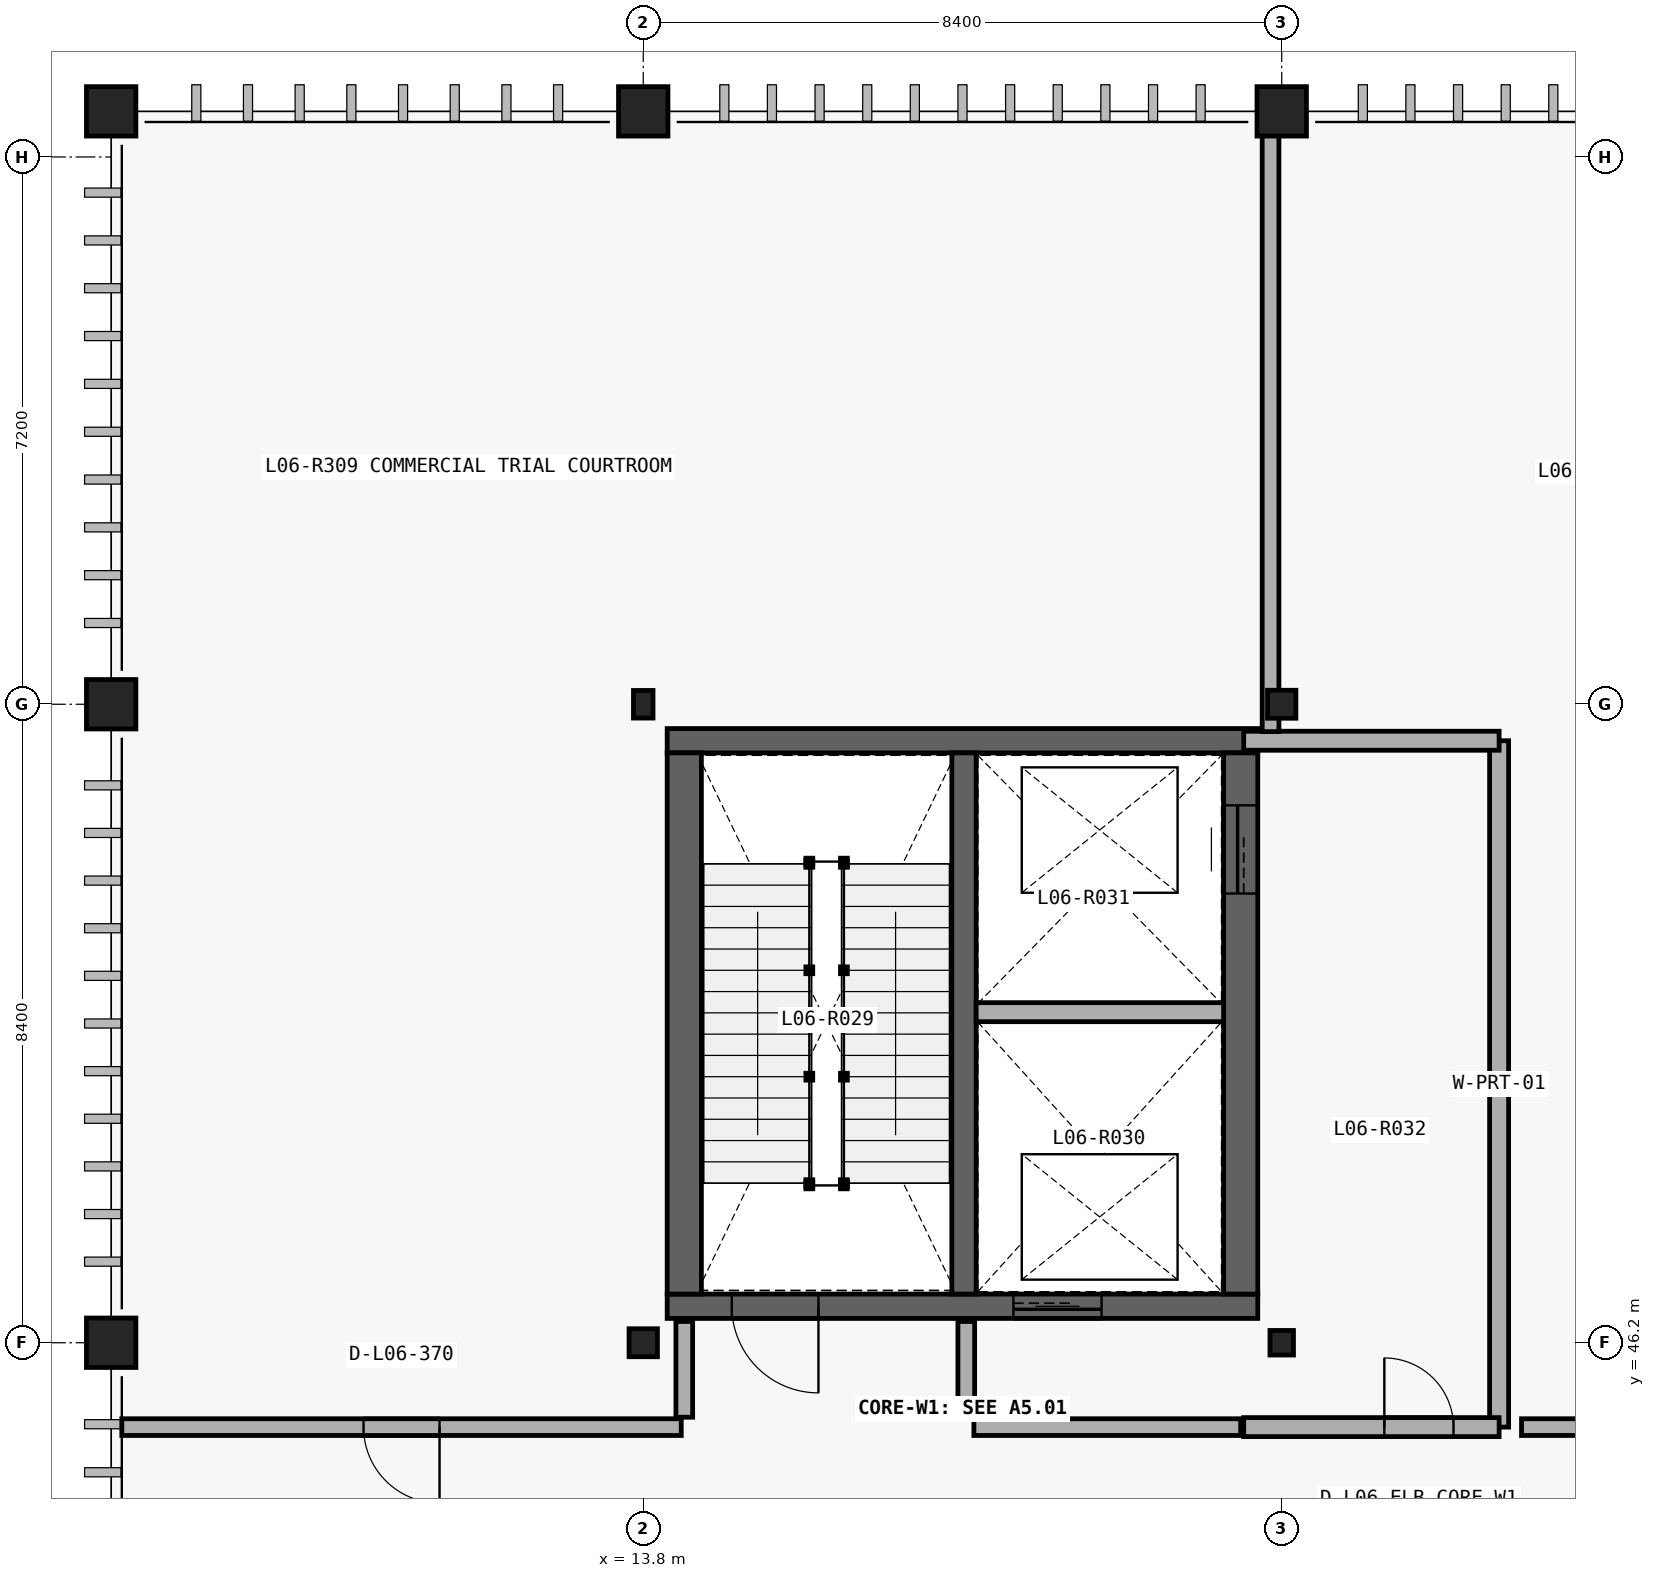
"""IFC4 building model, lengths in metres.
Left out: names, types, materials, properties, quantities, classifications, styles, units other than length and angle.
Written with IfcOpenShell. Run it as: python <this file> out.ifc"""

import sys

from ifc_helpers import new_model, si_unit, direction, frame, frame_2d, origin_with_axes, origin_2d_with_axis, place, context, subcontext, project, spatial, rectangle, circle, i_section, extrude, element, fill, save


model = new_model("IFC4")
c1 = context("Model", 3, precision=1e-05, world=origin_with_axes(), true_north=direction((0.0, 1.0)))
c2 = subcontext(c1, "Body", "Model", "MODEL_VIEW")
j1 = project(units=[si_unit("LENGTHUNIT", "METRE"), si_unit("PLANEANGLEUNIT", "RADIAN")], contexts=[c1])
p1 = place(None, origin_with_axes())
s1 = spatial("IfcSite", under=j1, at=p1, CompositionType="ELEMENT")
p2 = place(p1, origin_with_axes())
s2 = spatial("IfcBuilding", under=s1, at=p2, CompositionType="ELEMENT")
p3 = place(p2, frame((0.0, 0.0, 29.7), z_axis=(0.0, 0.0, 1.0), x_axis=(1.0, 0.0, 0.0)))
s3 = spatial("IfcBuildingStorey", under=s2, at=p3, CompositionType="ELEMENT", Elevation=29.7)
p4 = place(None, frame((14.115, 46.68, 29.7), z_axis=(0.0, 0.0, 1.0), x_axis=(1.0, 0.0, 0.0)))
e1 = element("IfcWall", 1, at=p4, inside=s3, PredefinedType="SHEAR", context=c2, shape_type="SweptSolid", body=[
    extrude(rectangle(XDim=7.77, YDim=0.32, at=frame_2d((3.885, 0.0), x_axis=(1.0, 0.0))), origin_with_axes(), (0.0, 0.0, 1.0), 4.8),
])
p5 = place(None, frame((15.535, 46.68, 29.7), z_axis=(0.0, 0.0, 1.0), x_axis=(1.0, 0.0, 0.0)))
e2 = element("IfcOpeningElement", 2, at=p5, cuts=e1, PredefinedType="OPENING", context=c2, shape_type="SweptSolid", body=[
    extrude(rectangle(XDim=1.14, YDim=2.18, at=frame_2d((0.0, 1.09), x_axis=(1.0, 0.0))), frame((0.0, 0.17, 0.0), z_axis=(0.0, -1.0, 0.0), x_axis=(1.0, 0.0, 0.0)), (0.0, 0.0, 1.0), 0.34),
])
p6 = place(None, frame((19.25, 46.68, 29.7), z_axis=(0.0, 0.0, 1.0), x_axis=(1.0, 0.0, 0.0)))
e3 = element("IfcOpeningElement", 3, at=p6, cuts=e1, PredefinedType="OPENING", context=c2, shape_type="SweptSolid", body=[
    extrude(rectangle(XDim=1.16, YDim=2.2, at=frame_2d((0.0, 1.1), x_axis=(1.0, 0.0))), frame((0.0, 0.17, 0.0), z_axis=(0.0, -1.0, 0.0), x_axis=(1.0, 0.0, 0.0)), (0.0, 0.0, 1.0), 0.34),
])
p7 = place(None, frame((21.885, 54.12, 29.7), z_axis=(0.0, 0.0, 1.0), x_axis=(-1.0, 0.0, 0.0)))
e4 = element("IfcWall", 4, at=p7, inside=s3, PredefinedType="SHEAR", context=c2, shape_type="SweptSolid", body=[
    extrude(rectangle(XDim=7.77, YDim=0.32, at=frame_2d((3.885, 0.0), x_axis=(1.0, 0.0))), origin_with_axes(), (0.0, 0.0, 1.0), 4.8),
])
p8 = place(None, frame((21.66, 46.84, 29.7), z_axis=(0.0, 0.0, 1.0), x_axis=(0.0, 1.0, 0.0)))
e5 = element("IfcWall", 5, at=p8, inside=s3, PredefinedType="SHEAR", context=c2, shape_type="SweptSolid", body=[
    extrude(rectangle(XDim=7.12, YDim=0.45, at=frame_2d((3.56, 0.0), x_axis=(1.0, 0.0))), origin_with_axes(), (0.0, 0.0, 1.0), 4.8),
])
p9 = place(None, frame((21.66, 52.69, 29.7), z_axis=(0.0, 0.0, 1.0), x_axis=(0.0, 1.0, 0.0)))
e6 = element("IfcOpeningElement", 6, at=p9, cuts=e5, PredefinedType="OPENING", context=c2, shape_type="SweptSolid", body=[
    extrude(rectangle(XDim=1.16, YDim=2.2, at=frame_2d((0.0, 1.1), x_axis=(1.0, 0.0))), frame((0.0, 0.235, 0.0), z_axis=(0.0, -1.0, 0.0), x_axis=(1.0, 0.0, 0.0)), (0.0, 0.0, 1.0), 0.47),
])
p10 = place(None, frame((14.34, 53.96, 29.7), z_axis=(0.0, 0.0, 1.0), x_axis=(0.0, -1.0, 0.0)))
e7 = element("IfcWall", 7, at=p10, inside=s3, PredefinedType="SHEAR", context=c2, shape_type="SweptSolid", body=[
    extrude(rectangle(XDim=7.12, YDim=0.45, at=frame_2d((3.56, 0.0), x_axis=(1.0, 0.0))), origin_with_axes(), (0.0, 0.0, 1.0), 4.8),
])
p11 = place(None, frame((18.02, 46.84, 29.7), z_axis=(0.0, 0.0, 1.0), x_axis=(0.0, 1.0, 0.0)))
e8 = element("IfcWall", 8, at=p11, inside=s3, PredefinedType="SHEAR", context=c2, shape_type="SweptSolid", body=[
    extrude(rectangle(XDim=7.12, YDim=0.32, at=frame_2d((3.56, 0.0), x_axis=(1.0, 0.0))), origin_with_axes(), (0.0, 0.0, 1.0), 4.8),
])
p12 = place(None, frame((18.18, 50.549, 29.7), z_axis=(0.0, 0.0, 1.0), x_axis=(1.0, 0.0, 0.0)))
e9 = element("IfcWall", 9, at=p12, inside=s3, PredefinedType="PARTITIONING", context=c2, shape_type="SweptSolid", body=[
    extrude(rectangle(XDim=3.255, YDim=0.25, at=frame_2d((1.627, 0.0), x_axis=(1.0, 0.0))), origin_with_axes(), (0.0, 0.0, 1.0), 4.48),
])
p13 = place(None, frame((25.06, 45.09, 29.7), z_axis=(0.0, 0.0, 1.0), x_axis=(0.0, 1.0, 0.0)))
e10 = element("IfcWall", 10, at=p13, inside=s3, PredefinedType="PARTITIONING", context=c2, shape_type="SweptSolid", body=[
    extrude(rectangle(XDim=9.03, YDim=0.25, at=frame_2d((4.515, 0.0), x_axis=(1.0, 0.0))), origin_with_axes(), (0.0, 0.0, 1.0), 4.48),
])
p14 = place(None, frame((21.7, 54.12, 29.7), z_axis=(0.0, 0.0, 1.0), x_axis=(1.0, 0.0, 0.0)))
e11 = element("IfcWall", 11, at=p14, inside=s3, PredefinedType="PARTITIONING", context=c2, shape_type="SweptSolid", body=[
    extrude(rectangle(XDim=3.36, YDim=0.25, at=frame_2d((1.68, 0.0), x_axis=(1.0, 0.0))), origin_with_axes(), (0.0, 0.0, 1.0), 4.48),
])
p15 = place(None, frame((21.7, 45.09, 29.7), z_axis=(0.0, 0.0, 1.0), x_axis=(1.0, 0.0, 0.0)))
e12 = element("IfcWall", 12, at=p15, inside=s3, PredefinedType="PARTITIONING", context=c2, shape_type="SweptSolid", body=[
    extrude(rectangle(XDim=3.36, YDim=0.25, at=frame_2d((1.68, 0.0), x_axis=(1.0, 0.0))), origin_with_axes(), (0.0, 0.0, 1.0), 4.48),
])
p16 = place(None, frame((24.005, 45.09, 29.7), z_axis=(0.0, 0.0, 1.0), x_axis=(1.0, 0.0, 0.0)))
e13 = element("IfcOpeningElement", 13, at=p16, cuts=e12, PredefinedType="OPENING", context=c2, shape_type="SweptSolid", body=[
    extrude(rectangle(XDim=0.91, YDim=2.12, at=frame_2d((0.0, 1.06), x_axis=(1.0, 0.0))), frame((0.0, 0.135, 0.0), z_axis=(0.0, -1.0, 0.0), x_axis=(1.0, 0.0, 0.0)), (0.0, 0.0, 1.0), 0.27),
])
for number, where, z_axis, x_axis in (
    (14, (14.34, 45.22, 29.7), (0.0, 0.0, 1.0), (0.0, 1.0, 0.0)),
    (15, (18.05, 45.22, 29.7), (0.0, 0.0, 1.0), (0.0, 1.0, 0.0)),
):
    element("IfcWall", number, at=place(None, frame(where, z_axis=z_axis, x_axis=x_axis)), inside=s3, PredefinedType="PARTITIONING", context=c2, shape_type="SweptSolid", body=[
        extrude(rectangle(XDim=1.26, YDim=0.22, at=frame_2d((0.63, 0.0), x_axis=(1.0, 0.0))), origin_with_axes(), (0.0, 0.0, 1.0), 4.48),
    ])
p17 = place(None, frame((6.94, 45.09, 29.7), z_axis=(0.0, 0.0, 1.0), x_axis=(1.0, 0.0, 0.0)))
e16 = element("IfcWall", 16, at=p17, inside=s3, PredefinedType="PARTITIONING", context=c2, shape_type="SweptSolid", body=[
    extrude(rectangle(XDim=7.36, YDim=0.22, at=frame_2d((3.68, 0.0), x_axis=(1.0, 0.0))), origin_with_axes(), (0.0, 0.0, 1.0), 4.48),
])
p18 = place(None, frame((10.62, 45.09, 29.7), z_axis=(0.0, 0.0, 1.0), x_axis=(1.0, 0.0, 0.0)))
e17 = element("IfcOpeningElement", 17, at=p18, cuts=e16, PredefinedType="OPENING", context=c2, shape_type="SweptSolid", body=[
    extrude(rectangle(XDim=1.0, YDim=2.28, at=frame_2d((0.0, 1.14), x_axis=(1.0, 0.0))), frame((0.0, 0.12, 0.0), z_axis=(0.0, -1.0, 0.0), x_axis=(1.0, 0.0, 0.0)), (0.0, 0.0, 1.0), 0.24),
])
p19 = place(None, frame((18.15, 45.09, 29.7), z_axis=(0.0, 0.0, 1.0), x_axis=(1.0, 0.0, 0.0)))
e18 = element("IfcWall", 18, at=p19, inside=s3, PredefinedType="PARTITIONING", context=c2, shape_type="SweptSolid", body=[
    extrude(rectangle(XDim=3.51, YDim=0.22, at=frame_2d((1.755, 0.0), x_axis=(1.0, 0.0))), origin_with_axes(), (0.0, 0.0, 1.0), 4.48),
])
p20 = place(None, frame((25.355, 45.09, 29.7), z_axis=(0.0, 0.0, 1.0), x_axis=(1.0, 0.0, 0.0)))
e19 = element("IfcWall", 19, at=p20, inside=s3, PredefinedType="PARTITIONING", context=c2, shape_type="SweptSolid", body=[
    extrude(rectangle(XDim=5.745, YDim=0.22, at=frame_2d((2.873, 0.0), x_axis=(1.0, 0.0))), origin_with_axes(), (0.0, 0.0, 1.0), 4.48),
])
p21 = place(None, frame((28.227, 45.09, 29.7), z_axis=(0.0, 0.0, 1.0), x_axis=(1.0, 0.0, 0.0)))
e20 = element("IfcOpeningElement", 20, at=p21, cuts=e19, PredefinedType="OPENING", context=c2, shape_type="SweptSolid", body=[
    extrude(rectangle(XDim=1.88, YDim=2.56, at=frame_2d((0.0, 1.28), x_axis=(1.0, 0.0))), frame((0.0, 0.12, 0.0), z_axis=(0.0, -1.0, 0.0), x_axis=(1.0, 0.0, 0.0)), (0.0, 0.0, 1.0), 0.24),
])
p22 = place(None, frame((22.053, 54.24, 29.7), z_axis=(0.0, 0.0, 1.0), x_axis=(0.0, 1.0, 0.0)))
e21 = element("IfcWall", 21, at=p22, inside=s3, PredefinedType="PARTITIONING", context=c2, shape_type="SweptSolid", body=[
    extrude(rectangle(XDim=8.02, YDim=0.22, at=frame_2d((4.01, 0.0), x_axis=(1.0, 0.0))), origin_with_axes(), (0.0, 0.0, 1.0), 3.858),
])
for number, where, z_axis, x_axis in (
    (22, (6.8, 46.2, 29.7), (0.0, 0.0, 1.0), (1.0, 0.0, 0.0)),
    (23, (6.8, 54.6, 29.7), (0.0, 0.0, 1.0), (1.0, 0.0, 0.0)),
    (24, (6.8, 62.4, 29.7), (0.0, 0.0, 1.0), (1.0, 0.0, 0.0)),
):
    element("IfcColumn", number, at=place(None, frame(where, z_axis=z_axis, x_axis=x_axis)), inside=s3, PredefinedType="COLUMN", context=c2, shape_type="SweptSolid", body=[
        extrude(circle(Radius=0.325, at=origin_2d_with_axis()), origin_with_axes(), (0.0, 0.0, 1.0), 4.8),
    ])
p23 = place(None, frame((13.8, 46.2, 29.7), z_axis=(0.0, 0.0, 1.0), x_axis=(1.0, 0.0, 0.0)))
e25 = element("IfcColumn", 25, at=p23, inside=s3, PredefinedType="COLUMN", context=c2, shape_type="SweptSolid", body=[
    extrude(i_section(OverallWidth=0.373, OverallDepth=0.368, WebThickness=0.015, FlangeThickness=0.024, at=origin_2d_with_axis()), origin_with_axes(), (0.0, 0.0, 1.0), 4.8),
])
p24 = place(None, frame((13.8, 54.6, 29.7), z_axis=(0.0, 0.0, 1.0), x_axis=(1.0, 0.0, 0.0)))
e26 = element("IfcColumn", 26, at=p24, inside=s3, PredefinedType="COLUMN", context=c2, shape_type="SweptSolid", body=[
    extrude(i_section(OverallWidth=0.257, OverallDepth=0.363, WebThickness=0.013, FlangeThickness=0.022, at=origin_2d_with_axis()), origin_with_axes(), (0.0, 0.0, 1.0), 4.8),
])
p25 = place(None, frame((13.8, 62.4, 29.7), z_axis=(0.0, 0.0, 1.0), x_axis=(1.0, 0.0, 0.0)))
e27 = element("IfcColumn", 27, at=p25, inside=s3, PredefinedType="COLUMN", context=c2, shape_type="SweptSolid", body=[
    extrude(circle(Radius=0.325, at=origin_2d_with_axis()), origin_with_axes(), (0.0, 0.0, 1.0), 4.8),
])
p26 = place(None, frame((22.2, 46.2, 29.7), z_axis=(0.0, 0.0, 1.0), x_axis=(1.0, 0.0, 0.0)))
e28 = element("IfcColumn", 28, at=p26, inside=s3, PredefinedType="COLUMN", context=c2, shape_type="SweptSolid", body=[
    extrude(i_section(OverallWidth=0.309, OverallDepth=0.323, WebThickness=0.014, FlangeThickness=0.023, at=origin_2d_with_axis()), origin_with_axes(), (0.0, 0.0, 1.0), 4.8),
])
p27 = place(None, frame((22.2, 54.6, 29.7), z_axis=(0.0, 0.0, 1.0), x_axis=(1.0, 0.0, 0.0)))
e29 = element("IfcColumn", 29, at=p27, inside=s3, PredefinedType="COLUMN", context=c2, shape_type="SweptSolid", body=[
    extrude(i_section(OverallWidth=0.373, OverallDepth=0.368, WebThickness=0.015, FlangeThickness=0.024, at=origin_2d_with_axis()), origin_with_axes(), (0.0, 0.0, 1.0), 4.8),
])
p28 = place(None, frame((22.2, 62.4, 29.7), z_axis=(0.0, 0.0, 1.0), x_axis=(1.0, 0.0, 0.0)))
e30 = element("IfcColumn", 30, at=p28, inside=s3, PredefinedType="COLUMN", context=c2, shape_type="SweptSolid", body=[
    extrude(circle(Radius=0.325, at=origin_2d_with_axis()), origin_with_axes(), (0.0, 0.0, 1.0), 4.8),
])
p29 = place(None, frame((15.535, 46.68, 29.7), z_axis=(0.0, 0.0, 1.0), x_axis=(-1.0, 0.0, 0.0)))
e31 = element("IfcDoor", 31, at=p29, inside=s3, OperationType="SINGLE_SWING_RIGHT", PredefinedType="DOOR", context=c2, shape_type="SweptSolid", body=[
    extrude(rectangle(XDim=1.14, YDim=2.18, at=frame_2d((0.0, 1.09), x_axis=(1.0, 0.0))), frame((0.0, 0.04, 0.0), z_axis=(0.0, -1.0, 0.0), x_axis=(1.0, 0.0, 0.0)), (0.0, 0.0, 1.0), 0.08),
])
fill(e2, e31)
p30 = place(None, frame((19.25, 46.68, 29.7), z_axis=(0.0, 0.0, 1.0), x_axis=(-1.0, 0.0, 0.0)))
e32 = element("IfcDoor", 32, at=p30, inside=s3, OperationType="SLIDING_TO_LEFT", PredefinedType="DOOR", context=c2, shape_type="SweptSolid", body=[
    extrude(rectangle(XDim=1.16, YDim=2.2, at=frame_2d((0.0, 1.1), x_axis=(1.0, 0.0))), frame((0.0, 0.04, 0.0), z_axis=(0.0, -1.0, 0.0), x_axis=(1.0, 0.0, 0.0)), (0.0, 0.0, 1.0), 0.08),
])
fill(e3, e32)
p31 = place(None, frame((21.66, 52.69, 29.7), z_axis=(0.0, 0.0, 1.0), x_axis=(0.0, 1.0, 0.0)))
e33 = element("IfcDoor", 33, at=p31, inside=s3, OperationType="SLIDING_TO_LEFT", PredefinedType="DOOR", context=c2, shape_type="SweptSolid", body=[
    extrude(rectangle(XDim=1.16, YDim=2.2, at=frame_2d((0.0, 1.1), x_axis=(1.0, 0.0))), frame((0.0, 0.04, 0.0), z_axis=(0.0, -1.0, 0.0), x_axis=(1.0, 0.0, 0.0)), (0.0, 0.0, 1.0), 0.08),
])
fill(e6, e33)
p32 = place(None, frame((24.005, 45.09, 29.7), z_axis=(0.0, 0.0, 1.0), x_axis=(1.0, 0.0, 0.0)))
e34 = element("IfcDoor", 34, at=p32, inside=s3, OperationType="SINGLE_SWING_LEFT", PredefinedType="DOOR", context=c2, shape_type="SweptSolid", body=[
    extrude(rectangle(XDim=0.91, YDim=2.12, at=frame_2d((0.0, 1.06), x_axis=(1.0, 0.0))), frame((0.0, 0.04, 0.0), z_axis=(0.0, -1.0, 0.0), x_axis=(1.0, 0.0, 0.0)), (0.0, 0.0, 1.0), 0.08),
])
fill(e13, e34)
p33 = place(None, frame((10.62, 45.09, 29.7), z_axis=(0.0, 0.0, 1.0), x_axis=(-1.0, 0.0, 0.0)))
e35 = element("IfcDoor", 35, at=p33, inside=s3, OperationType="SINGLE_SWING_RIGHT", PredefinedType="DOOR", context=c2, shape_type="SweptSolid", body=[
    extrude(rectangle(XDim=1.0, YDim=2.28, at=frame_2d((0.0, 1.14), x_axis=(1.0, 0.0))), frame((0.0, 0.04, 0.0), z_axis=(0.0, -1.0, 0.0), x_axis=(1.0, 0.0, 0.0)), (0.0, 0.0, 1.0), 0.08),
])
fill(e17, e35)
save(model, sys.argv[1])
